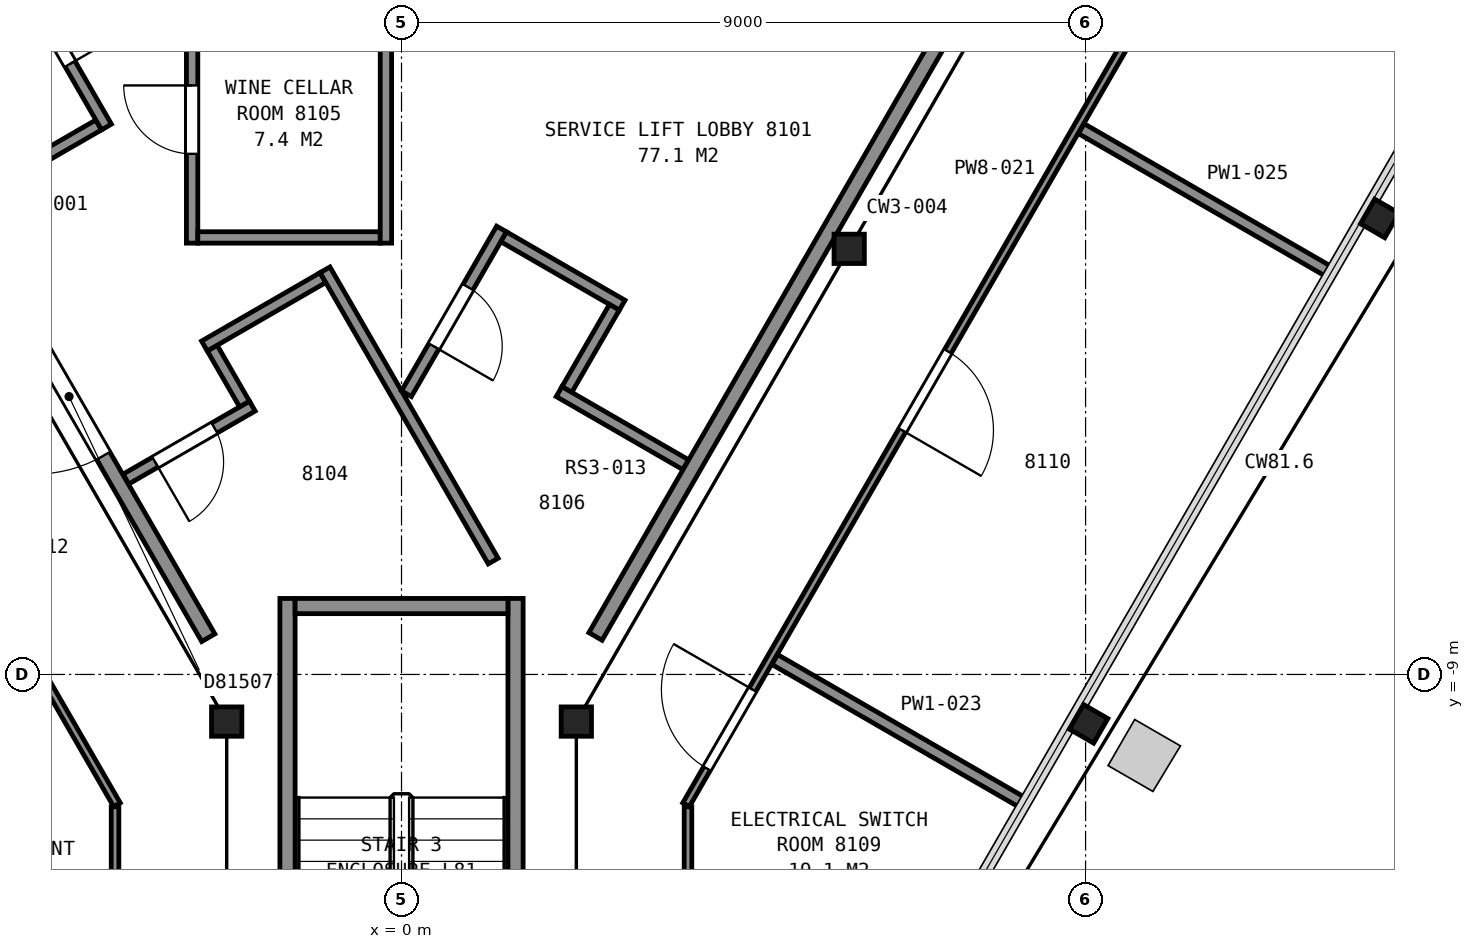
"""IFC4 building model, lengths in metres.
Left out: names, types, materials, properties, quantities, classifications, styles, units other than length and angle.
Written with IfcOpenShell. Run it as: python <this file> out.ifc"""

import sys

from ifc_helpers import new_model, si_unit, direction, frame, frame_2d, origin, origin_2d, place, context, subcontext, project, spatial, rectangle, i_section, extrude, element, fill, save


model = new_model("IFC4")
c1 = context("Model", 3, precision=1e-05, world=origin(), true_north=direction((0.0, 1.0)))
c2 = subcontext(c1, "Body", "Model", "MODEL_VIEW")
j1 = project(units=[si_unit("LENGTHUNIT", "METRE"), si_unit("PLANEANGLEUNIT", "RADIAN")], contexts=[c1])
p1 = place(None, origin())
s1 = spatial("IfcSite", under=j1, at=p1, CompositionType="ELEMENT")
p2 = place(p1, origin())
s2 = spatial("IfcBuilding", under=s1, at=p2, CompositionType="ELEMENT")
p3 = place(p2, frame((0.0, 0.0, 321.0)))
s3 = spatial("IfcBuildingStorey", under=s2, at=p3, CompositionType="ELEMENT", Elevation=321.0)
for number, where, z_axis, x_axis in (
    (1, (9.04, -9.65, 0.0), (0.0, 0.0, 1.0), (-0.5, -0.866, 0.0)),
    (2, (12.87, -3.0, 0.0), (0.0, 0.0, 1.0), (-0.5, -0.866, 0.0)),
):
    element("IfcColumn", number, at=place(p3, frame(where, z_axis=z_axis, x_axis=x_axis)), inside=s3, PredefinedType="COLUMN", context=c2, shape_type="SweptSolid", body=[
        extrude(i_section(OverallWidth=0.373, OverallDepth=0.368, WebThickness=0.015, FlangeThickness=0.024, FilletRadius=0.015, at=origin_2d()), origin(), (0.0, 0.0, 1.0), 4.2),
    ])
for number, where, z_axis, x_axis in (
    (3, (-2.3, -9.62, 0.0), (0.0, 0.0, 1.0), (1.0, 0.0, 0.0)),
    (4, (2.3, -9.62, 0.0), (0.0, 0.0, 1.0), (1.0, 0.0, 0.0)),
    (5, (5.89, -3.4, 0.0), (0.0, 0.0, 1.0), (1.0, 0.0, 0.0)),
):
    element("IfcColumn", number, at=place(p3, frame(where, z_axis=z_axis, x_axis=x_axis)), inside=s3, PredefinedType="COLUMN", context=c2, shape_type="SweptSolid", body=[
        extrude(i_section(OverallWidth=0.399, OverallDepth=0.386, WebThickness=0.021, FlangeThickness=0.033, FilletRadius=0.015, at=origin_2d()), origin(), (0.0, 0.0, 1.0), 4.2),
    ])
for number, where, z_axis, x_axis in (
    (6, (1.5, -8.0, 0.0), (0.0, 0.0, 1.0), (0.0, -1.0, 0.0)),
    (7, (-1.5, -8.0, 0.0), (0.0, 0.0, 1.0), (0.0, -1.0, 0.0)),
):
    element("IfcWall", number, at=place(p3, frame(where, z_axis=z_axis, x_axis=x_axis)), inside=s3, PredefinedType="PARTITIONING", context=c2, shape_type="SweptSolid", body=[
        extrude(rectangle(XDim=7.2, YDim=0.2, at=frame_2d((3.6, 0.0))), origin(), (0.0, 0.0, 1.0), 3.95),
    ])
p4 = place(p3, frame((-1.4, -8.1, 0.0), z_axis=(0.0, 0.0, 1.0), x_axis=(1.0, 0.0, 0.0)))
e8 = element("IfcWall", 8, at=p4, inside=s3, PredefinedType="PARTITIONING", context=c2, shape_type="SweptSolid", body=[
    extrude(rectangle(XDim=2.8, YDim=0.2, at=frame_2d((1.4, 0.0))), origin(), (0.0, 0.0, 1.0), 3.95),
])
p5 = place(p3, frame((-7.141, -0.551, 0.0), z_axis=(0.0, 0.0, 1.0), x_axis=(0.499992795234, -0.866029563418, 0.0)))
e9 = element("IfcWall", 9, at=p5, inside=s3, PredefinedType="PARTITIONING", context=c2, shape_type="SweptSolid", body=[
    extrude(rectangle(XDim=9.198, YDim=0.2, at=frame_2d((4.599, 0.0))), origin(), (0.0, 0.0, 1.0), 3.95),
])
p6 = place(p5, frame((4.634, 0.0, 0.0)))
e10 = element("IfcOpeningElement", 10, at=p6, cuts=e9, PredefinedType="OPENING", context=c2, shape_type="SweptSolid", body=[
    extrude(rectangle(XDim=1.8, YDim=2.1, at=frame_2d((0.9, 1.05))), frame((0.0, 0.11, 0.0), z_axis=(0.0, -1.0, 0.0), x_axis=(1.0, 0.0, 0.0)), (0.0, 0.0, 1.0), 0.22),
])
p7 = place(p3, frame((-5.737, -2.782, 0.0), z_axis=(0.0, 0.0, 1.0), x_axis=(0.866000843773, 0.500042536776, 0.0)))
e11 = element("IfcWall", 11, at=p7, inside=s3, PredefinedType="PARTITIONING", context=c2, shape_type="SweptSolid", body=[
    extrude(rectangle(XDim=2.025, YDim=0.15, at=frame_2d((1.012, 0.0))), origin(), (0.0, 0.0, 1.0), 3.95),
])
p8 = place(p3, frame((-3.882, -1.797, 0.0), z_axis=(0.0, 0.0, 1.0), x_axis=(-0.500016307898, 0.86601598821, 0.0)))
e12 = element("IfcWall", 12, at=p8, inside=s3, PredefinedType="PARTITIONING", context=c2, shape_type="SweptSolid", body=[
    extrude(rectangle(XDim=2.709, YDim=0.15, at=frame_2d((1.354, 0.0))), origin(), (0.0, 0.0, 1.0), 3.95),
])
p9 = place(p8, frame((0.959, 0.0, 0.0)))
e13 = element("IfcOpeningElement", 13, at=p9, cuts=e12, PredefinedType="OPENING", context=c2, shape_type="SweptSolid", body=[
    extrude(rectangle(XDim=0.9, YDim=2.1, at=frame_2d((0.45, 1.05))), frame((0.0, 0.085, 0.0), z_axis=(0.0, -1.0, 0.0), x_axis=(1.0, 0.0, 0.0)), (0.0, 0.0, 1.0), 0.17),
])
p10 = place(p3, frame((-1.963, -5.469, 0.0), z_axis=(0.0, 0.0, 1.0), x_axis=(-0.866043720474, -0.49996827322, 0.0)))
e14 = element("IfcWall", 14, at=p10, inside=s3, PredefinedType="PARTITIONING", context=c2, shape_type="SweptSolid", body=[
    extrude(rectangle(XDim=1.92, YDim=0.15, at=frame_2d((0.96, 0.0))), origin(), (0.0, 0.0, 1.0), 3.95),
])
p11 = place(p10, frame((0.575, 0.0, 0.0)))
e15 = element("IfcOpeningElement", 15, at=p11, cuts=e14, PredefinedType="OPENING", context=c2, shape_type="SweptSolid", body=[
    extrude(rectangle(XDim=0.9, YDim=2.1, at=frame_2d((0.45, 1.05))), frame((0.0, 0.085, 0.0), z_axis=(0.0, -1.0, 0.0), x_axis=(1.0, 0.0, 0.0)), (0.0, 0.0, 1.0), 0.17),
])
p12 = place(p3, frame((-2.755, -0.102, 0.0), z_axis=(0.0, 0.0, 1.0), x_axis=(0.0, -1.0, 0.0)))
e16 = element("IfcWall", 16, at=p12, inside=s3, PredefinedType="PARTITIONING", context=c2, shape_type="SweptSolid", body=[
    extrude(rectangle(XDim=3.223, YDim=0.15, at=frame_2d((1.611, 0.0))), origin(), (0.0, 0.0, 1.0), 3.95),
])
p13 = place(p12, frame((1.148, 0.0, 0.0)))
e17 = element("IfcOpeningElement", 17, at=p13, cuts=e16, PredefinedType="OPENING", context=c2, shape_type="SweptSolid", body=[
    extrude(rectangle(XDim=0.9, YDim=2.1, at=frame_2d((0.45, 1.05))), frame((0.0, 0.085, 0.0), z_axis=(0.0, -1.0, 0.0), x_axis=(1.0, 0.0, 0.0)), (0.0, 0.0, 1.0), 0.17),
])
p14 = place(p3, frame((-2.68, -3.25, 0.0), z_axis=(0.0, 0.0, 1.0), x_axis=(1.0, 0.0, 0.0)))
e18 = element("IfcWall", 18, at=p14, inside=s3, PredefinedType="PARTITIONING", context=c2, shape_type="SweptSolid", body=[
    extrude(rectangle(XDim=2.4, YDim=0.15, at=frame_2d((1.2, 0.0))), origin(), (0.0, 0.0, 1.0), 3.95),
])
p15 = place(p3, frame((-2.49, -4.706, 0.0), z_axis=(0.0, 0.0, 1.0), x_axis=(0.500062241894, -0.865989465428, 0.0)))
e19 = element("IfcWall", 19, at=p15, inside=s3, PredefinedType="PARTITIONING", context=c2, shape_type="SweptSolid", body=[
    extrude(rectangle(XDim=0.85, YDim=0.15, at=frame_2d((0.425, 0.0))), origin(), (0.0, 0.0, 1.0), 3.95),
])
p16 = place(p3, frame((-2.593, -4.678, 0.0), z_axis=(0.0, 0.0, 1.0), x_axis=(0.866081705922, 0.499902469156, 0.0)))
e20 = element("IfcWall", 20, at=p16, inside=s3, PredefinedType="PARTITIONING", context=c2, shape_type="SweptSolid", body=[
    extrude(rectangle(XDim=1.8, YDim=0.15, at=frame_2d((0.9, 0.0))), origin(), (0.0, 0.0, 1.0), 3.95),
])
p17 = place(p3, frame((-1.007, -3.676, 0.0), z_axis=(0.0, 0.0, 1.0), x_axis=(0.500037662692, -0.866003658127, 0.0)))
e21 = element("IfcWall", 21, at=p17, inside=s3, PredefinedType="PARTITIONING", context=c2, shape_type="SweptSolid", body=[
    extrude(rectangle(XDim=4.425, YDim=0.15, at=frame_2d((2.212, 0.0))), origin(), (0.0, 0.0, 1.0), 3.95),
])
p18 = place(p3, frame((-0.205, -3.325, 0.0), z_axis=(0.0, 0.0, 1.0), x_axis=(0.0, 1.0, 0.0)))
e22 = element("IfcWall", 22, at=p18, inside=s3, PredefinedType="PARTITIONING", context=c2, shape_type="SweptSolid", body=[
    extrude(rectangle(XDim=3.223, YDim=0.15, at=frame_2d((1.611, 0.0))), origin(), (0.0, 0.0, 1.0), 3.95),
])
p19 = place(p3, frame((1.316, -3.139, 0.0), z_axis=(0.0, 0.0, 1.0), x_axis=(-0.500063042646, -0.865989003036, 0.0)))
e23 = element("IfcWall", 23, at=p19, inside=s3, PredefinedType="PARTITIONING", context=c2, shape_type="SweptSolid", body=[
    extrude(rectangle(XDim=2.503, YDim=0.15, at=frame_2d((1.251, 0.0))), origin(), (0.0, 0.0, 1.0), 3.95),
])
p20 = place(p19, frame((0.883, 0.0, 0.0)))
e24 = element("IfcOpeningElement", 24, at=p20, cuts=e23, PredefinedType="OPENING", context=c2, shape_type="SweptSolid", body=[
    extrude(rectangle(XDim=0.9, YDim=2.1, at=frame_2d((0.45, 1.05))), frame((0.0, 0.085, 0.0), z_axis=(0.0, -1.0, 0.0), x_axis=(1.0, 0.0, 0.0)), (0.0, 0.0, 1.0), 0.17),
])
p21 = place(p3, frame((1.344, -3.241, 0.0), z_axis=(0.0, 0.0, 1.0), x_axis=(0.865989075817, -0.500062916607, 0.0)))
e25 = element("IfcWall", 25, at=p21, inside=s3, PredefinedType="PARTITIONING", context=c2, shape_type="SweptSolid", body=[
    extrude(rectangle(XDim=1.8, YDim=0.15, at=frame_2d((0.9, 0.0))), origin(), (0.0, 0.0, 1.0), 3.95),
])
p22 = place(p3, frame((2.176, -5.251, 0.0), z_axis=(0.0, 0.0, 1.0), x_axis=(0.500173430036, 0.86592525075, 0.0)))
e26 = element("IfcWall", 26, at=p22, inside=s3, PredefinedType="PARTITIONING", context=c2, shape_type="SweptSolid", body=[
    extrude(rectangle(XDim=1.25, YDim=0.15, at=frame_2d((0.625, 0.0))), origin(), (0.0, 0.0, 1.0), 3.95),
])
p23 = place(p3, frame((2.073, -5.279, 0.0), z_axis=(0.0, 0.0, 1.0), x_axis=(0.86609690551, -0.499876134923, 0.0)))
e27 = element("IfcWall", 27, at=p23, inside=s3, PredefinedType="PARTITIONING", context=c2, shape_type="SweptSolid", body=[
    extrude(rectangle(XDim=1.925, YDim=0.15, at=frame_2d((0.963, 0.0))), origin(), (0.0, 0.0, 1.0), 3.95),
])
p24 = place(p3, frame((2.552, -8.5, 0.0), z_axis=(0.0, 0.0, 1.0), x_axis=(0.499967462014, 0.866044188784, 0.0)))
e28 = element("IfcWall", 28, at=p24, inside=s3, PredefinedType="PARTITIONING", context=c2, shape_type="SweptSolid", body=[
    extrude(rectangle(XDim=13.025, YDim=0.2, at=frame_2d((6.512, 0.0))), origin(), (0.0, 0.0, 1.0), 3.95),
])
p25 = place(p3, frame((-3.744, -10.714, 0.0), z_axis=(0.0, 0.0, 1.0), x_axis=(-0.500044034969, 0.86599997869, 0.0)))
e29 = element("IfcWall", 29, at=p25, inside=s3, PredefinedType="PARTITIONING", context=c2, shape_type="SweptSolid", body=[
    extrude(rectangle(XDim=15.553, YDim=0.1, at=frame_2d((7.776, 0.0))), origin(), (0.0, 0.0, 1.0), 3.297),
])
p26 = place(p25, frame((7.814, 0.0, 0.0)))
e30 = element("IfcOpeningElement", 30, at=p26, cuts=e29, PredefinedType="OPENING", context=c2, shape_type="SweptSolid", body=[
    extrude(rectangle(XDim=1.5, YDim=2.1, at=frame_2d((0.75, 1.05))), frame((0.0, 0.06, 0.0), z_axis=(0.0, -1.0, 0.0), x_axis=(1.0, 0.0, 0.0)), (0.0, 0.0, 1.0), 0.12),
])
p27 = place(p3, frame((-3.769, -18.253, 0.0), z_axis=(0.0, 0.0, 1.0), x_axis=(0.0, 1.0, 0.0)))
e31 = element("IfcWall", 31, at=p27, inside=s3, PredefinedType="PARTITIONING", context=c2, shape_type="SweptSolid", body=[
    extrude(rectangle(XDim=7.512, YDim=0.1, at=frame_2d((3.756, 0.0))), origin(), (0.0, 0.0, 1.0), 3.297),
])
p28 = place(p27, frame((3.184, 0.0, 0.0)))
e32 = element("IfcOpeningElement", 32, at=p28, cuts=e31, PredefinedType="OPENING", context=c2, shape_type="SweptSolid", body=[
    extrude(rectangle(XDim=1.5, YDim=2.1, at=frame_2d((0.75, 1.05))), frame((0.0, 0.06, 0.0), z_axis=(0.0, -1.0, 0.0), x_axis=(1.0, 0.0, 0.0)), (0.0, 0.0, 1.0), 0.12),
])
p29 = place(p3, frame((3.769, -18.253, 0.0), z_axis=(0.0, 0.0, 1.0), x_axis=(0.0, 1.0, 0.0)))
e33 = element("IfcWall", 33, at=p29, inside=s3, PredefinedType="PARTITIONING", context=c2, shape_type="SweptSolid", body=[
    extrude(rectangle(XDim=7.512, YDim=0.1, at=frame_2d((3.756, 0.0))), origin(), (0.0, 0.0, 1.0), 3.297),
])
p30 = place(p3, frame((11.521, 2.754, 0.0), z_axis=(0.0, 0.0, 1.0), x_axis=(-0.500044034969, -0.86599997869, 0.0)))
e34 = element("IfcWall", 34, at=p30, inside=s3, PredefinedType="PARTITIONING", context=c2, shape_type="SweptSolid", body=[
    extrude(rectangle(XDim=15.553, YDim=0.1, at=frame_2d((7.776, 0.0))), origin(), (0.0, 0.0, 1.0), 3.297),
])
p31 = place(p30, frame((13.803, 0.0, 0.0)))
e35 = element("IfcOpeningElement", 35, at=p31, cuts=e34, PredefinedType="OPENING", context=c2, shape_type="SweptSolid", body=[
    extrude(rectangle(XDim=1.2, YDim=2.1, at=frame_2d((0.6, 1.05))), frame((0.0, 0.06, 0.0), z_axis=(0.0, -1.0, 0.0), x_axis=(1.0, 0.0, 0.0)), (0.0, 0.0, 1.0), 0.12),
])
p32 = place(p30, frame((8.665, 0.0, 0.0)))
e36 = element("IfcOpeningElement", 36, at=p32, cuts=e34, PredefinedType="OPENING", context=c2, shape_type="SweptSolid", body=[
    extrude(rectangle(XDim=1.2, YDim=2.1, at=frame_2d((0.6, 1.05))), frame((0.0, 0.06, 0.0), z_axis=(0.0, -1.0, 0.0), x_axis=(1.0, 0.0, 0.0)), (0.0, 0.0, 1.0), 0.12),
])
p33 = place(p30, frame((2.049, 0.0, 0.0)))
e37 = element("IfcOpeningElement", 37, at=p33, cuts=e34, PredefinedType="OPENING", context=c2, shape_type="SweptSolid", body=[
    extrude(rectangle(XDim=1.2, YDim=2.1, at=frame_2d((0.6, 1.05))), frame((0.0, 0.06, 0.0), z_axis=(0.0, -1.0, 0.0), x_axis=(1.0, 0.0, 0.0)), (0.0, 0.0, 1.0), 0.12),
])
p34 = place(p3, frame((4.911, -8.803, 0.0), z_axis=(0.0, 0.0, 1.0), x_axis=(0.865975758382, -0.500085978503, 0.0)))
e38 = element("IfcWall", 38, at=p34, inside=s3, PredefinedType="PARTITIONING", context=c2, shape_type="SweptSolid", body=[
    extrude(rectangle(XDim=3.779, YDim=0.15, at=frame_2d((1.889, 0.0))), origin(), (0.0, 0.0, 1.0), 3.297),
])
p35 = place(p3, frame((8.944, -1.819, 0.0), z_axis=(0.0, 0.0, 1.0), x_axis=(0.865987581393, -0.500065504582, 0.0)))
e39 = element("IfcWall", 39, at=p35, inside=s3, PredefinedType="PARTITIONING", context=c2, shape_type="SweptSolid", body=[
    extrude(rectangle(XDim=3.778, YDim=0.15, at=frame_2d((1.889, 0.0))), origin(), (0.0, 0.0, 1.0), 3.297),
])
p36 = place(p6, origin())
e40 = element("IfcDoor", 40, at=p36, inside=s3, OperationType="DOUBLE_DOOR_SINGLE_SWING", PredefinedType="DOOR", context=c2, shape_type="SweptSolid", body=[
    extrude(rectangle(XDim=1.8, YDim=2.1, at=frame_2d((0.9, 1.05))), frame((0.0, 0.025, 0.0), z_axis=(0.0, -1.0, 0.0), x_axis=(1.0, 0.0, 0.0)), (0.0, 0.0, 1.0), 0.05),
])
fill(e10, e40)
p37 = place(p9, origin())
e41 = element("IfcDoor", 41, at=p37, inside=s3, OperationType="SINGLE_SWING_LEFT", PredefinedType="DOOR", context=c2, shape_type="SweptSolid", body=[
    extrude(rectangle(XDim=0.9, YDim=2.1, at=frame_2d((0.45, 1.05))), frame((0.0, 0.025, 0.0), z_axis=(0.0, -1.0, 0.0), x_axis=(1.0, 0.0, 0.0)), (0.0, 0.0, 1.0), 0.05),
])
fill(e13, e41)
p38 = place(p11, origin())
e42 = element("IfcDoor", 42, at=p38, inside=s3, OperationType="SINGLE_SWING_RIGHT", PredefinedType="DOOR", context=c2, shape_type="SweptSolid", body=[
    extrude(rectangle(XDim=0.9, YDim=2.1, at=frame_2d((0.45, 1.05))), frame((0.0, 0.025, 0.0), z_axis=(0.0, -1.0, 0.0), x_axis=(1.0, 0.0, 0.0)), (0.0, 0.0, 1.0), 0.05),
])
fill(e15, e42)
p39 = place(p13, origin())
e43 = element("IfcDoor", 43, at=p39, inside=s3, OperationType="SINGLE_SWING_LEFT", PredefinedType="DOOR", context=c2, shape_type="SweptSolid", body=[
    extrude(rectangle(XDim=0.9, YDim=2.1, at=frame_2d((0.45, 1.05))), frame((0.0, 0.025, 0.0), z_axis=(0.0, -1.0, 0.0), x_axis=(1.0, 0.0, 0.0)), (0.0, 0.0, 1.0), 0.05),
])
fill(e17, e43)
p40 = place(p20, origin())
e44 = element("IfcDoor", 44, at=p40, inside=s3, OperationType="SINGLE_SWING_RIGHT", PredefinedType="DOOR", context=c2, shape_type="SweptSolid", body=[
    extrude(rectangle(XDim=0.9, YDim=2.1, at=frame_2d((0.45, 1.05))), frame((0.0, 0.025, 0.0), z_axis=(0.0, -1.0, 0.0), x_axis=(1.0, 0.0, 0.0)), (0.0, 0.0, 1.0), 0.05),
])
fill(e24, e44)
p41 = place(p31, origin())
e45 = element("IfcDoor", 45, at=p41, inside=s3, OperationType="SINGLE_SWING_LEFT", PredefinedType="DOOR", context=c2, shape_type="SweptSolid", body=[
    extrude(rectangle(XDim=1.2, YDim=2.1, at=frame_2d((0.6, 1.05))), frame((0.0, 0.025, 0.0), z_axis=(0.0, -1.0, 0.0), x_axis=(1.0, 0.0, 0.0)), (0.0, 0.0, 1.0), 0.05),
])
fill(e35, e45)
p42 = place(p32, origin())
e46 = element("IfcDoor", 46, at=p42, inside=s3, OperationType="SINGLE_SWING_RIGHT", PredefinedType="DOOR", context=c2, shape_type="SweptSolid", body=[
    extrude(rectangle(XDim=1.2, YDim=2.1, at=frame_2d((0.6, 1.05))), frame((0.0, 0.025, 0.0), z_axis=(0.0, -1.0, 0.0), x_axis=(1.0, 0.0, 0.0)), (0.0, 0.0, 1.0), 0.05),
])
fill(e36, e46)
save(model, sys.argv[1])
